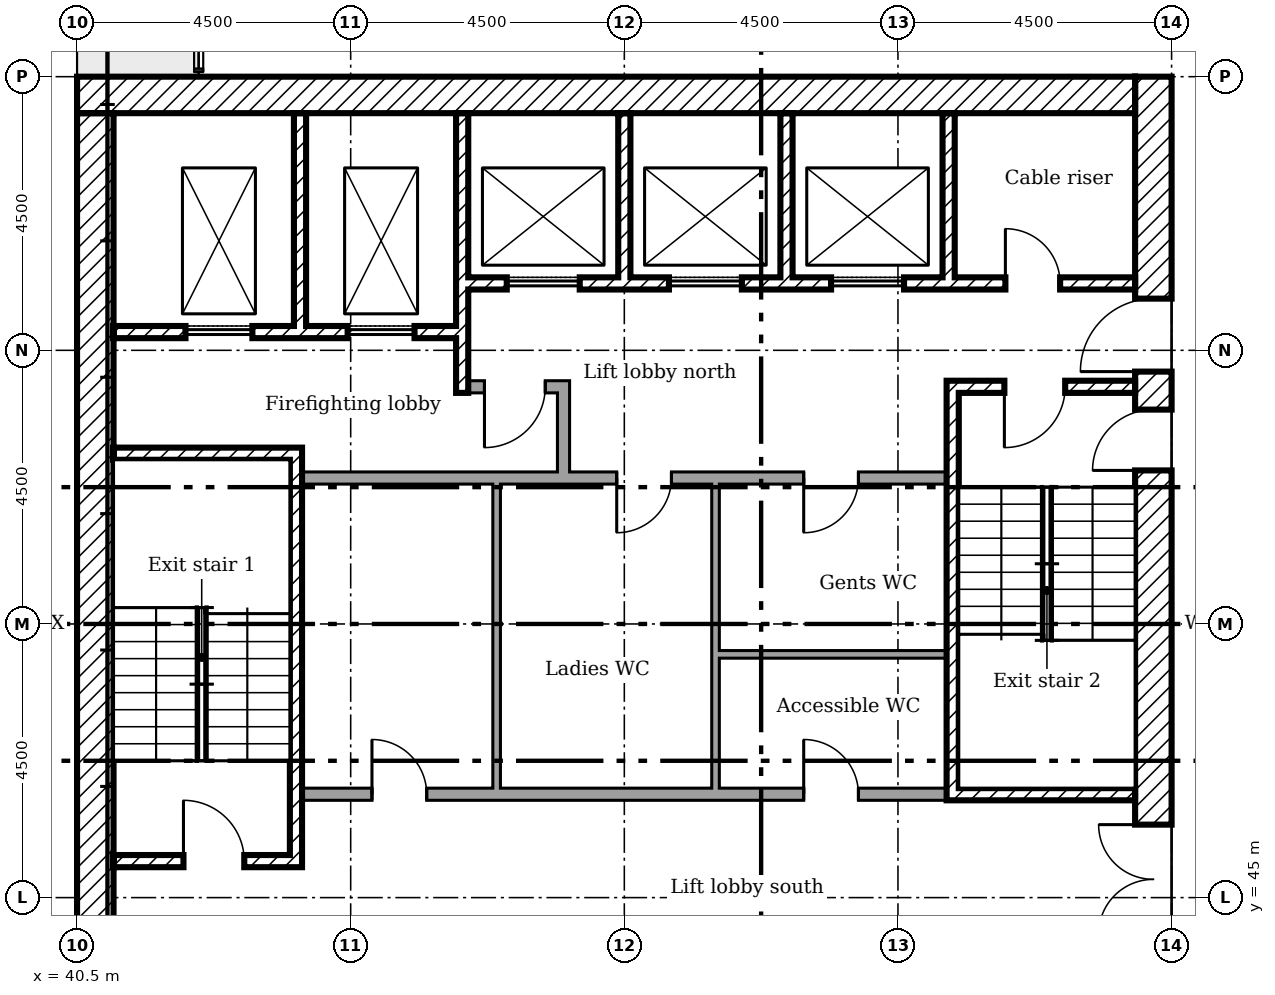
"""IFC4 building model, lengths in metres.
Left out: names, types, materials, properties, quantities, classifications, styles, units other than length and angle.
Written with IfcOpenShell. Run it as: python <this file> out.ifc"""

import sys

from ifc_helpers import new_model, si_unit, direction, frame, frame_2d, origin, place, context, subcontext, project, spatial, rectangle, extrude, element, fill, save


model = new_model("IFC4")
c1 = context("Model", 3, precision=1e-05, world=origin(), true_north=direction((0.0, 1.0)))
c2 = subcontext(c1, "Body", "Model", "MODEL_VIEW")
j1 = project(units=[si_unit("LENGTHUNIT", "METRE"), si_unit("PLANEANGLEUNIT", "RADIAN")], contexts=[c1])
p1 = place(None, origin())
s1 = spatial("IfcSite", under=j1, at=p1, CompositionType="ELEMENT")
p2 = place(p1, origin())
s2 = spatial("IfcBuilding", under=s1, at=p2, CompositionType="ELEMENT")
p3 = place(p2, frame((0.0, 0.0, 165.4)))
s3 = spatial("IfcBuildingStorey", under=s2, at=p3, CompositionType="ELEMENT", Elevation=165.4)
p4 = place(p3, frame((58.2, 40.5, 0.0), z_axis=(0.0, 0.0, 1.0), x_axis=(0.0, 1.0, 0.0)))
e1 = element("IfcWall", 1, at=p4, inside=s3, PredefinedType="SHEAR", context=c2, shape_type="SweptSolid", body=[
    extrude(rectangle(XDim=18.0, YDim=0.6, at=frame_2d((9.0, 0.0))), origin(), (0.0, 0.0, 1.0), 3.35),
])
p5 = place(p4, frame((13.15, 0.0, 0.0)))
e2 = element("IfcOpeningElement", 2, at=p5, cuts=e1, PredefinedType="OPENING", context=c2, shape_type="SweptSolid", body=[
    extrude(rectangle(XDim=1.2, YDim=2.1, at=frame_2d((0.6, 1.05))), frame((0.0, 0.31, 0.0), z_axis=(0.0, -1.0, 0.0), x_axis=(1.0, 0.0, 0.0)), (0.0, 0.0, 1.0), 0.62),
])
p6 = place(p4, frame((3.9, 0.0, 0.0)))
e3 = element("IfcOpeningElement", 3, at=p6, cuts=e1, PredefinedType="OPENING", context=c2, shape_type="SweptSolid", body=[
    extrude(rectangle(XDim=1.8, YDim=2.1, at=frame_2d((0.9, 1.05))), frame((0.0, 0.31, 0.0), z_axis=(0.0, -1.0, 0.0), x_axis=(1.0, 0.0, 0.0)), (0.0, 0.0, 1.0), 0.62),
])
p7 = place(p4, frame((11.525, 0.0, 0.0)))
e4 = element("IfcOpeningElement", 4, at=p7, cuts=e1, PredefinedType="OPENING", context=c2, shape_type="SweptSolid", body=[
    extrude(rectangle(XDim=1.0, YDim=2.1, at=frame_2d((0.5, 1.05))), frame((0.0, 0.31, 0.0), z_axis=(0.0, -1.0, 0.0), x_axis=(1.0, 0.0, 0.0)), (0.0, 0.0, 1.0), 0.62),
])
p8 = place(p3, frame((40.5, 58.2, 0.0)))
e5 = element("IfcWall", 5, at=p8, inside=s3, PredefinedType="SHEAR", context=c2, shape_type="SweptSolid", body=[
    extrude(rectangle(XDim=17.4, YDim=0.6, at=frame_2d((8.7, 0.0))), origin(), (0.0, 0.0, 1.0), 3.35),
])
p9 = place(p3, frame((40.8, 41.1, 0.0), z_axis=(0.0, 0.0, 1.0), x_axis=(0.0, 1.0, 0.0)))
e6 = element("IfcWall", 6, at=p9, inside=s3, PredefinedType="SHEAR", context=c2, shape_type="SweptSolid", body=[
    extrude(rectangle(XDim=16.8, YDim=0.6, at=frame_2d((8.4, 0.0))), origin(), (0.0, 0.0, 1.0), 3.35),
])
p10 = place(p3, frame((44.167, 57.9, 0.0), z_axis=(0.0, 0.0, 1.0), x_axis=(0.0, -1.0, 0.0)))
e7 = element("IfcWall", 7, at=p10, inside=s3, PredefinedType="SHEAR", context=c2, shape_type="SweptSolid", body=[
    extrude(rectangle(XDim=3.5, YDim=0.2, at=frame_2d((1.75, 0.0))), origin(), (0.0, 0.0, 1.0), 3.35),
])
p11 = place(p3, frame((46.833, 57.9, 0.0), z_axis=(0.0, 0.0, 1.0), x_axis=(0.0, -1.0, 0.0)))
e8 = element("IfcWall", 8, at=p11, inside=s3, PredefinedType="SHEAR", context=c2, shape_type="SweptSolid", body=[
    extrude(rectangle(XDim=4.6, YDim=0.2, at=frame_2d((2.3, 0.0))), origin(), (0.0, 0.0, 1.0), 3.35),
])
for number, where, z_axis, x_axis in (
    (9, (49.5, 57.9, 0.0), (0.0, 0.0, 1.0), (0.0, -1.0, 0.0)),
    (10, (52.167, 57.9, 0.0), (0.0, 0.0, 1.0), (0.0, -1.0, 0.0)),
    (11, (54.833, 57.9, 0.0), (0.0, 0.0, 1.0), (0.0, -1.0, 0.0)),
):
    element("IfcWall", number, at=place(p3, frame(where, z_axis=z_axis, x_axis=x_axis)), inside=s3, PredefinedType="SHEAR", context=c2, shape_type="SweptSolid", body=[
        extrude(rectangle(XDim=2.7, YDim=0.2, at=frame_2d((1.35, 0.0))), origin(), (0.0, 0.0, 1.0), 3.35),
    ])
p12 = place(p3, frame((48.5, 51.9, 0.0), z_axis=(0.0, 0.0, 1.0), x_axis=(0.0, 1.0, 0.0)))
e12 = element("IfcWall", 12, at=p12, inside=s3, PredefinedType="PARTITIONING", context=c2, shape_type="SweptSolid", body=[
    extrude(rectangle(XDim=1.6, YDim=0.2, at=frame_2d((0.8, 0.0))), origin(), (0.0, 0.0, 1.0), 3.35),
])
p13 = place(p3, frame((46.933, 53.4, 0.0)))
e13 = element("IfcWall", 13, at=p13, inside=s3, PredefinedType="PARTITIONING", context=c2, shape_type="SweptSolid", body=[
    extrude(rectangle(XDim=1.467, YDim=0.2, at=frame_2d((0.733, 0.0))), origin(), (0.0, 0.0, 1.0), 3.35),
])
p14 = place(p13, frame((0.267, 0.0, 0.0)))
e14 = element("IfcOpeningElement", 14, at=p14, cuts=e13, PredefinedType="OPENING", context=c2, shape_type="SweptSolid", body=[
    extrude(rectangle(XDim=1.0, YDim=2.1, at=frame_2d((0.5, 1.05))), frame((0.0, 0.11, 0.0), z_axis=(0.0, -1.0, 0.0), x_axis=(1.0, 0.0, 0.0)), (0.0, 0.0, 1.0), 0.22),
])
p15 = place(p3, frame((46.933, 55.1, 0.0)))
e15 = element("IfcWall", 15, at=p15, inside=s3, PredefinedType="SHEAR", context=c2, shape_type="SweptSolid", body=[
    extrude(rectangle(XDim=10.967, YDim=0.2, at=frame_2d((5.483, 0.0))), origin(), (0.0, 0.0, 1.0), 3.35),
])
p16 = place(p15, frame((8.833, 0.0, 0.0)))
e16 = element("IfcOpeningElement", 16, at=p16, cuts=e15, PredefinedType="OPENING", context=c2, shape_type="SweptSolid", body=[
    extrude(rectangle(XDim=0.9, YDim=2.1, at=frame_2d((0.45, 1.05))), frame((0.0, 0.11, 0.0), z_axis=(0.0, -1.0, 0.0), x_axis=(1.0, 0.0, 0.0)), (0.0, 0.0, 1.0), 0.22),
])
p17 = place(p15, frame((0.633, 0.0, 0.0)))
e17 = element("IfcOpeningElement", 17, at=p17, cuts=e15, PredefinedType="OPENING", context=c2, shape_type="SweptSolid", body=[
    extrude(rectangle(XDim=1.2, YDim=2.1, at=frame_2d((0.6, 1.05))), frame((0.0, 0.11, 0.0), z_axis=(0.0, -1.0, 0.0), x_axis=(1.0, 0.0, 0.0)), (0.0, 0.0, 1.0), 0.22),
])
p18 = place(p15, frame((3.3, 0.0, 0.0)))
e18 = element("IfcOpeningElement", 18, at=p18, cuts=e15, PredefinedType="OPENING", context=c2, shape_type="SweptSolid", body=[
    extrude(rectangle(XDim=1.2, YDim=2.1, at=frame_2d((0.6, 1.05))), frame((0.0, 0.11, 0.0), z_axis=(0.0, -1.0, 0.0), x_axis=(1.0, 0.0, 0.0)), (0.0, 0.0, 1.0), 0.22),
])
p19 = place(p15, frame((5.967, 0.0, 0.0)))
e19 = element("IfcOpeningElement", 19, at=p19, cuts=e15, PredefinedType="OPENING", context=c2, shape_type="SweptSolid", body=[
    extrude(rectangle(XDim=1.2, YDim=2.1, at=frame_2d((0.6, 1.05))), frame((0.0, 0.11, 0.0), z_axis=(0.0, -1.0, 0.0), x_axis=(1.0, 0.0, 0.0)), (0.0, 0.0, 1.0), 0.22),
])
p20 = place(p3, frame((41.1, 54.3, 0.0)))
e20 = element("IfcWall", 20, at=p20, inside=s3, PredefinedType="SHEAR", context=c2, shape_type="SweptSolid", body=[
    extrude(rectangle(XDim=5.633, YDim=0.2, at=frame_2d((2.817, 0.0))), origin(), (0.0, 0.0, 1.0), 3.35),
])
p21 = place(p20, frame((1.183, 0.0, 0.0)))
e21 = element("IfcOpeningElement", 21, at=p21, cuts=e20, PredefinedType="OPENING", context=c2, shape_type="SweptSolid", body=[
    extrude(rectangle(XDim=1.1, YDim=2.1, at=frame_2d((0.55, 1.05))), frame((0.0, 0.11, 0.0), z_axis=(0.0, -1.0, 0.0), x_axis=(1.0, 0.0, 0.0)), (0.0, 0.0, 1.0), 0.22),
])
p22 = place(p20, frame((3.85, 0.0, 0.0)))
e22 = element("IfcOpeningElement", 22, at=p22, cuts=e20, PredefinedType="OPENING", context=c2, shape_type="SweptSolid", body=[
    extrude(rectangle(XDim=1.1, YDim=2.1, at=frame_2d((0.55, 1.05))), frame((0.0, 0.11, 0.0), z_axis=(0.0, -1.0, 0.0), x_axis=(1.0, 0.0, 0.0)), (0.0, 0.0, 1.0), 0.22),
])
p23 = place(p3, frame((44.1, 45.5, 0.0), z_axis=(0.0, 0.0, 1.0), x_axis=(0.0, 1.0, 0.0)))
e23 = element("IfcWall", 23, at=p23, inside=s3, PredefinedType="SHEAR", context=c2, shape_type="SweptSolid", body=[
    extrude(rectangle(XDim=6.9, YDim=0.2, at=frame_2d((3.45, 0.0))), origin(), (0.0, 0.0, 1.0), 3.35),
])
p24 = place(p3, frame((41.1, 52.3, 0.0)))
e24 = element("IfcWall", 24, at=p24, inside=s3, PredefinedType="SHEAR", context=c2, shape_type="SweptSolid", body=[
    extrude(rectangle(XDim=2.9, YDim=0.2, at=frame_2d((1.45, 0.0))), origin(), (0.0, 0.0, 1.0), 3.35),
])
p25 = place(p3, frame((41.1, 45.6, 0.0)))
e25 = element("IfcWall", 25, at=p25, inside=s3, PredefinedType="SHEAR", context=c2, shape_type="SweptSolid", body=[
    extrude(rectangle(XDim=2.9, YDim=0.2, at=frame_2d((1.45, 0.0))), origin(), (0.0, 0.0, 1.0), 3.35),
])
p26 = place(p25, frame((1.15, 0.0, 0.0)))
e26 = element("IfcOpeningElement", 26, at=p26, cuts=e25, PredefinedType="OPENING", context=c2, shape_type="SweptSolid", body=[
    extrude(rectangle(XDim=1.0, YDim=2.1, at=frame_2d((0.5, 1.05))), frame((0.0, 0.11, 0.0), z_axis=(0.0, -1.0, 0.0), x_axis=(1.0, 0.0, 0.0)), (0.0, 0.0, 1.0), 0.22),
])
p27 = place(p3, frame((54.8, 53.4, 0.0)))
e27 = element("IfcWall", 27, at=p27, inside=s3, PredefinedType="SHEAR", context=c2, shape_type="SweptSolid", body=[
    extrude(rectangle(XDim=3.1, YDim=0.2, at=frame_2d((1.55, 0.0))), origin(), (0.0, 0.0, 1.0), 3.35),
])
p28 = place(p27, frame((0.95, 0.0, 0.0)))
e28 = element("IfcOpeningElement", 28, at=p28, cuts=e27, PredefinedType="OPENING", context=c2, shape_type="SweptSolid", body=[
    extrude(rectangle(XDim=1.0, YDim=2.1, at=frame_2d((0.5, 1.05))), frame((0.0, 0.11, 0.0), z_axis=(0.0, -1.0, 0.0), x_axis=(1.0, 0.0, 0.0)), (0.0, 0.0, 1.0), 0.22),
])
p29 = place(p3, frame((54.8, 46.7, 0.0)))
e29 = element("IfcWall", 29, at=p29, inside=s3, PredefinedType="SHEAR", context=c2, shape_type="SweptSolid", body=[
    extrude(rectangle(XDim=3.1, YDim=0.2, at=frame_2d((1.55, 0.0))), origin(), (0.0, 0.0, 1.0), 3.35),
])
p30 = place(p3, frame((54.9, 46.8, 0.0), z_axis=(0.0, 0.0, 1.0), x_axis=(0.0, 1.0, 0.0)))
e30 = element("IfcWall", 30, at=p30, inside=s3, PredefinedType="SHEAR", context=c2, shape_type="SweptSolid", body=[
    extrude(rectangle(XDim=6.5, YDim=0.2, at=frame_2d((3.25, 0.0))), origin(), (0.0, 0.0, 1.0), 3.35),
])
p31 = place(p3, frame((44.2, 51.9, 0.0)))
e31 = element("IfcWall", 31, at=p31, inside=s3, PredefinedType="PARTITIONING", context=c2, shape_type="SweptSolid", body=[
    extrude(rectangle(XDim=10.6, YDim=0.2, at=frame_2d((5.3, 0.0))), origin(), (0.0, 0.0, 1.0), 3.35),
])
p32 = place(p31, frame((5.175, 0.0, 0.0)))
e32 = element("IfcOpeningElement", 32, at=p32, cuts=e31, PredefinedType="OPENING", context=c2, shape_type="SweptSolid", body=[
    extrude(rectangle(XDim=0.9, YDim=2.1, at=frame_2d((0.45, 1.05))), frame((0.0, 0.11, 0.0), z_axis=(0.0, -1.0, 0.0), x_axis=(1.0, 0.0, 0.0)), (0.0, 0.0, 1.0), 0.22),
])
p33 = place(p31, frame((8.25, 0.0, 0.0)))
e33 = element("IfcOpeningElement", 33, at=p33, cuts=e31, PredefinedType="OPENING", context=c2, shape_type="SweptSolid", body=[
    extrude(rectangle(XDim=0.9, YDim=2.1, at=frame_2d((0.45, 1.05))), frame((0.0, 0.11, 0.0), z_axis=(0.0, -1.0, 0.0), x_axis=(1.0, 0.0, 0.0)), (0.0, 0.0, 1.0), 0.22),
])
p34 = place(p3, frame((44.2, 46.7, 0.0)))
e34 = element("IfcWall", 34, at=p34, inside=s3, PredefinedType="PARTITIONING", context=c2, shape_type="SweptSolid", body=[
    extrude(rectangle(XDim=10.6, YDim=0.2, at=frame_2d((5.3, 0.0))), origin(), (0.0, 0.0, 1.0), 3.35),
])
p35 = place(p34, frame((1.15, 0.0, 0.0)))
e35 = element("IfcOpeningElement", 35, at=p35, cuts=e34, PredefinedType="OPENING", context=c2, shape_type="SweptSolid", body=[
    extrude(rectangle(XDim=0.9, YDim=2.1, at=frame_2d((0.45, 1.05))), frame((0.0, 0.11, 0.0), z_axis=(0.0, -1.0, 0.0), x_axis=(1.0, 0.0, 0.0)), (0.0, 0.0, 1.0), 0.22),
])
p36 = place(p34, frame((8.25, 0.0, 0.0)))
e36 = element("IfcOpeningElement", 36, at=p36, cuts=e34, PredefinedType="OPENING", context=c2, shape_type="SweptSolid", body=[
    extrude(rectangle(XDim=0.9, YDim=2.1, at=frame_2d((0.45, 1.05))), frame((0.0, 0.11, 0.0), z_axis=(0.0, -1.0, 0.0), x_axis=(1.0, 0.0, 0.0)), (0.0, 0.0, 1.0), 0.22),
])
p37 = place(p3, frame((47.4, 46.8, 0.0), z_axis=(0.0, 0.0, 1.0), x_axis=(0.0, 1.0, 0.0)))
e37 = element("IfcWall", 37, at=p37, inside=s3, PredefinedType="PARTITIONING", context=c2, shape_type="SweptSolid", body=[
    extrude(rectangle(XDim=5.0, YDim=0.125, at=frame_2d((2.5, 0.0))), origin(), (0.0, 0.0, 1.0), 3.35),
])
p38 = place(p3, frame((51.0, 46.8, 0.0), z_axis=(0.0, 0.0, 1.0), x_axis=(0.0, 1.0, 0.0)))
e38 = element("IfcWall", 38, at=p38, inside=s3, PredefinedType="PARTITIONING", context=c2, shape_type="SweptSolid", body=[
    extrude(rectangle(XDim=2.262, YDim=0.125, at=frame_2d((1.131, 0.0))), origin(), (0.0, 0.0, 1.0), 3.35),
])
p39 = place(p3, frame((54.8, 49.0, 0.0), z_axis=(0.0, 0.0, 1.0), x_axis=(-1.0, 0.0, 0.0)))
e39 = element("IfcWall", 39, at=p39, inside=s3, PredefinedType="PARTITIONING", context=c2, shape_type="SweptSolid", body=[
    extrude(rectangle(XDim=3.738, YDim=0.125, at=frame_2d((1.869, 0.0))), origin(), (0.0, 0.0, 1.0), 3.35),
])
p40 = place(p3, frame((51.0, 49.0, 0.0), z_axis=(0.0, 0.0, 1.0), x_axis=(0.0, 1.0, 0.0)))
e40 = element("IfcWall", 40, at=p40, inside=s3, PredefinedType="PARTITIONING", context=c2, shape_type="SweptSolid", body=[
    extrude(rectangle(XDim=2.8, YDim=0.125, at=frame_2d((1.4, 0.0))), origin(), (0.0, 0.0, 1.0), 3.35),
])
p41 = place(p5, origin())
e41 = element("IfcDoor", 41, at=p41, inside=s3, OperationType="SINGLE_SWING_RIGHT", PredefinedType="DOOR", context=c2, shape_type="SweptSolid", body=[
    extrude(rectangle(XDim=1.2, YDim=2.1, at=frame_2d((0.6, 1.05))), frame((0.0, 0.025, 0.0), z_axis=(0.0, -1.0, 0.0), x_axis=(1.0, 0.0, 0.0)), (0.0, 0.0, 1.0), 0.05),
])
fill(e2, e41)
p42 = place(p6, origin())
e42 = element("IfcDoor", 42, at=p42, inside=s3, OperationType="DOUBLE_DOOR_SINGLE_SWING", PredefinedType="DOOR", context=c2, shape_type="SweptSolid", body=[
    extrude(rectangle(XDim=1.8, YDim=2.1, at=frame_2d((0.9, 1.05))), frame((0.0, 0.025, 0.0), z_axis=(0.0, -1.0, 0.0), x_axis=(1.0, 0.0, 0.0)), (0.0, 0.0, 1.0), 0.05),
])
fill(e3, e42)
p43 = place(p26, origin())
e43 = element("IfcDoor", 43, at=p43, inside=s3, OperationType="SINGLE_SWING_RIGHT", PredefinedType="DOOR", context=c2, shape_type="SweptSolid", body=[
    extrude(rectangle(XDim=1.0, YDim=2.1, at=frame_2d((0.5, 1.05))), frame((0.0, 0.025, 0.0), z_axis=(0.0, -1.0, 0.0), x_axis=(1.0, 0.0, 0.0)), (0.0, 0.0, 1.0), 0.05),
])
fill(e26, e43)
p44 = place(p28, frame((1.0, 0.0, 0.0), x_axis=(-1.0, 0.0, 0.0)))
e44 = element("IfcDoor", 44, at=p44, inside=s3, OperationType="SINGLE_SWING_LEFT", PredefinedType="DOOR", context=c2, shape_type="SweptSolid", body=[
    extrude(rectangle(XDim=1.0, YDim=2.1, at=frame_2d((0.5, 1.05))), frame((0.0, 0.025, 0.0), z_axis=(0.0, -1.0, 0.0), x_axis=(1.0, 0.0, 0.0)), (0.0, 0.0, 1.0), 0.05),
])
fill(e28, e44)
p45 = place(p7, origin())
e45 = element("IfcDoor", 45, at=p45, inside=s3, OperationType="SINGLE_SWING_RIGHT", PredefinedType="DOOR", context=c2, shape_type="SweptSolid", body=[
    extrude(rectangle(XDim=1.0, YDim=2.1, at=frame_2d((0.5, 1.05))), frame((0.0, 0.025, 0.0), z_axis=(0.0, -1.0, 0.0), x_axis=(1.0, 0.0, 0.0)), (0.0, 0.0, 1.0), 0.05),
])
fill(e4, e45)
p46 = place(p14, frame((1.0, 0.0, 0.0), x_axis=(-1.0, 0.0, 0.0)))
e46 = element("IfcDoor", 46, at=p46, inside=s3, OperationType="SINGLE_SWING_LEFT", PredefinedType="DOOR", context=c2, shape_type="SweptSolid", body=[
    extrude(rectangle(XDim=1.0, YDim=2.1, at=frame_2d((0.5, 1.05))), frame((0.0, 0.025, 0.0), z_axis=(0.0, -1.0, 0.0), x_axis=(1.0, 0.0, 0.0)), (0.0, 0.0, 1.0), 0.05),
])
fill(e14, e46)
p47 = place(p16, origin())
e47 = element("IfcDoor", 47, at=p47, inside=s3, OperationType="SINGLE_SWING_RIGHT", PredefinedType="DOOR", context=c2, shape_type="SweptSolid", body=[
    extrude(rectangle(XDim=0.9, YDim=2.1, at=frame_2d((0.45, 1.05))), frame((0.0, 0.025, 0.0), z_axis=(0.0, -1.0, 0.0), x_axis=(1.0, 0.0, 0.0)), (0.0, 0.0, 1.0), 0.05),
])
fill(e16, e47)
p48 = place(p35, origin())
e48 = element("IfcDoor", 48, at=p48, inside=s3, OperationType="SINGLE_SWING_RIGHT", PredefinedType="DOOR", context=c2, shape_type="SweptSolid", body=[
    extrude(rectangle(XDim=0.9, YDim=2.1, at=frame_2d((0.45, 1.05))), frame((0.0, 0.025, 0.0), z_axis=(0.0, -1.0, 0.0), x_axis=(1.0, 0.0, 0.0)), (0.0, 0.0, 1.0), 0.05),
])
fill(e35, e48)
p49 = place(p32, frame((0.9, 0.0, 0.0), x_axis=(-1.0, 0.0, 0.0)))
e49 = element("IfcDoor", 49, at=p49, inside=s3, OperationType="SINGLE_SWING_LEFT", PredefinedType="DOOR", context=c2, shape_type="SweptSolid", body=[
    extrude(rectangle(XDim=0.9, YDim=2.1, at=frame_2d((0.45, 1.05))), frame((0.0, 0.025, 0.0), z_axis=(0.0, -1.0, 0.0), x_axis=(1.0, 0.0, 0.0)), (0.0, 0.0, 1.0), 0.05),
])
fill(e32, e49)
p50 = place(p36, origin())
e50 = element("IfcDoor", 50, at=p50, inside=s3, OperationType="SINGLE_SWING_RIGHT", PredefinedType="DOOR", context=c2, shape_type="SweptSolid", body=[
    extrude(rectangle(XDim=0.9, YDim=2.1, at=frame_2d((0.45, 1.05))), frame((0.0, 0.025, 0.0), z_axis=(0.0, -1.0, 0.0), x_axis=(1.0, 0.0, 0.0)), (0.0, 0.0, 1.0), 0.05),
])
fill(e36, e50)
p51 = place(p33, frame((0.9, 0.0, 0.0), x_axis=(-1.0, 0.0, 0.0)))
e51 = element("IfcDoor", 51, at=p51, inside=s3, OperationType="SINGLE_SWING_LEFT", PredefinedType="DOOR", context=c2, shape_type="SweptSolid", body=[
    extrude(rectangle(XDim=0.9, YDim=2.1, at=frame_2d((0.45, 1.05))), frame((0.0, 0.025, 0.0), z_axis=(0.0, -1.0, 0.0), x_axis=(1.0, 0.0, 0.0)), (0.0, 0.0, 1.0), 0.05),
])
fill(e33, e51)
p52 = place(p21, origin())
e52 = element("IfcDoor", 52, at=p52, inside=s3, OperationType="SLIDING_TO_LEFT", PredefinedType="DOOR", context=c2, shape_type="SweptSolid", body=[
    extrude(rectangle(XDim=1.1, YDim=2.1, at=frame_2d((0.55, 1.05))), frame((0.0, 0.025, 0.0), z_axis=(0.0, -1.0, 0.0), x_axis=(1.0, 0.0, 0.0)), (0.0, 0.0, 1.0), 0.05),
])
fill(e21, e52)
p53 = place(p22, origin())
e53 = element("IfcDoor", 53, at=p53, inside=s3, OperationType="SLIDING_TO_LEFT", PredefinedType="DOOR", context=c2, shape_type="SweptSolid", body=[
    extrude(rectangle(XDim=1.1, YDim=2.1, at=frame_2d((0.55, 1.05))), frame((0.0, 0.025, 0.0), z_axis=(0.0, -1.0, 0.0), x_axis=(1.0, 0.0, 0.0)), (0.0, 0.0, 1.0), 0.05),
])
fill(e22, e53)
p54 = place(p17, origin())
e54 = element("IfcDoor", 54, at=p54, inside=s3, OperationType="SLIDING_TO_LEFT", PredefinedType="DOOR", context=c2, shape_type="SweptSolid", body=[
    extrude(rectangle(XDim=1.2, YDim=2.1, at=frame_2d((0.6, 1.05))), frame((0.0, 0.025, 0.0), z_axis=(0.0, -1.0, 0.0), x_axis=(1.0, 0.0, 0.0)), (0.0, 0.0, 1.0), 0.05),
])
fill(e17, e54)
p55 = place(p18, origin())
e55 = element("IfcDoor", 55, at=p55, inside=s3, OperationType="SLIDING_TO_LEFT", PredefinedType="DOOR", context=c2, shape_type="SweptSolid", body=[
    extrude(rectangle(XDim=1.2, YDim=2.1, at=frame_2d((0.6, 1.05))), frame((0.0, 0.025, 0.0), z_axis=(0.0, -1.0, 0.0), x_axis=(1.0, 0.0, 0.0)), (0.0, 0.0, 1.0), 0.05),
])
fill(e18, e55)
p56 = place(p19, origin())
e56 = element("IfcDoor", 56, at=p56, inside=s3, OperationType="SLIDING_TO_LEFT", PredefinedType="DOOR", context=c2, shape_type="SweptSolid", body=[
    extrude(rectangle(XDim=1.2, YDim=2.1, at=frame_2d((0.6, 1.05))), frame((0.0, 0.025, 0.0), z_axis=(0.0, -1.0, 0.0), x_axis=(1.0, 0.0, 0.0)), (0.0, 0.0, 1.0), 0.05),
])
fill(e19, e56)
save(model, sys.argv[1])
